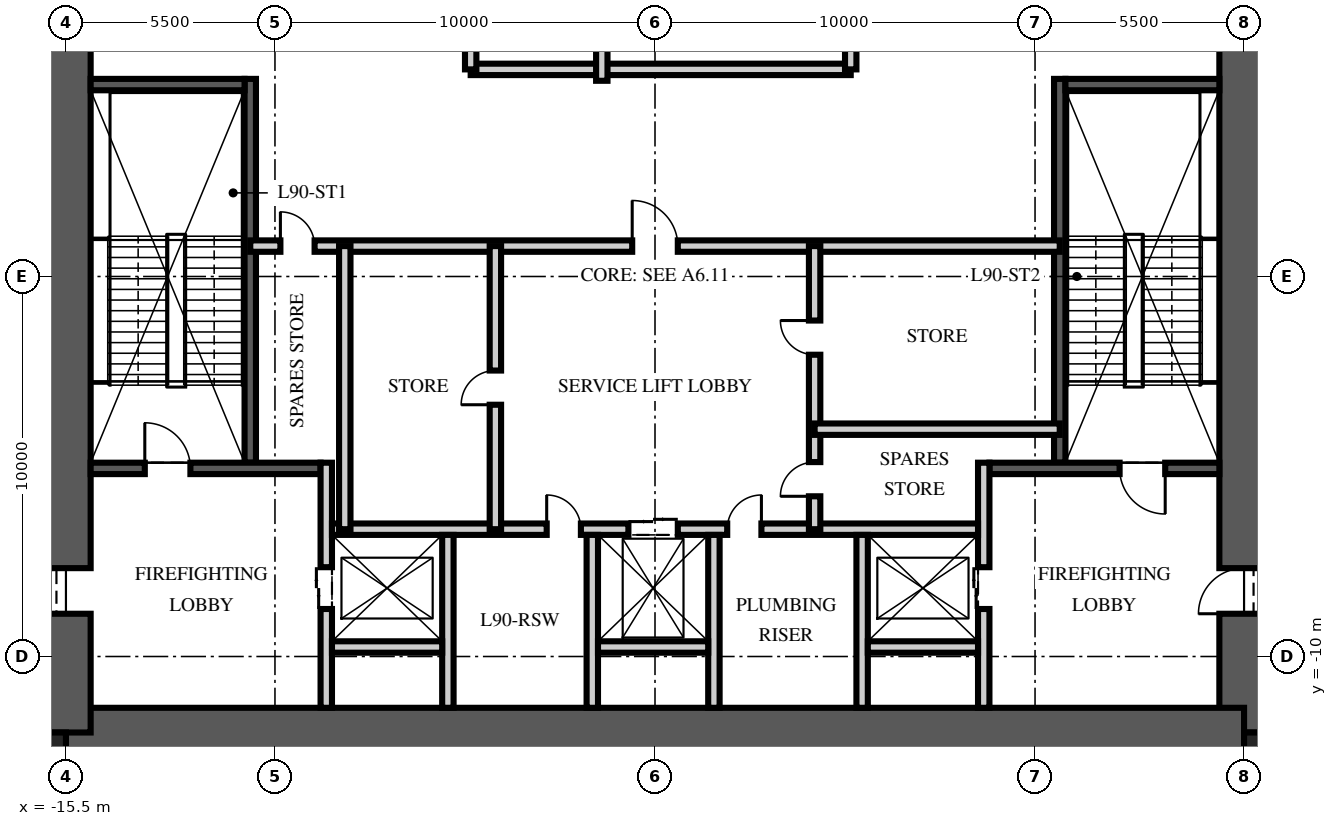
"""IFC4 building model, lengths in metres.
Left out: names, types, materials, properties, quantities, classifications, styles, units other than length and angle.
Written with IfcOpenShell. Run it as: python <this file> out.ifc"""

import sys

from ifc_helpers import new_model, si_unit, direction, frame, frame_2d, origin, origin_2d, place, context, subcontext, project, spatial, rectangle, extrude, element, fill, save


model = new_model("IFC4")
c1 = context("Model", 3, precision=1e-05, world=origin(), true_north=direction((0.0, 1.0)))
c2 = subcontext(c1, "Body", "Model", "MODEL_VIEW")
j1 = project(units=[si_unit("LENGTHUNIT", "METRE"), si_unit("PLANEANGLEUNIT", "RADIAN")], contexts=[c1])
p1 = place(None, origin())
s1 = spatial("IfcSite", under=j1, at=p1, CompositionType="ELEMENT")
p2 = place(p1, origin())
s2 = spatial("IfcBuilding", under=s1, at=p2, CompositionType="ELEMENT")
p3 = place(p2, frame((0.0, 0.0, 358.25)))
s3 = spatial("IfcBuildingStorey", under=s2, at=p3, CompositionType="ELEMENT", Elevation=358.25)
p4 = place(p3, frame((15.5, -12.0, -0.3), z_axis=(0.0, 0.0, 1.0), x_axis=(0.0, 1.0, 0.0)))
e1 = element("IfcWall", 1, at=p4, inside=s3, PredefinedType="SHEAR", context=c2, shape_type="SweptSolid", body=[
    extrude(rectangle(XDim=24.0, YDim=1.3, at=frame_2d((12.0, 0.0))), origin(), (0.0, 0.0, 1.0), 4.95),
])
p5 = place(p4, frame((3.125, 0.0, 0.3)))
e2 = element("IfcOpeningElement", 2, at=p5, cuts=e1, PredefinedType="OPENING", context=c2, shape_type="SweptSolid", body=[
    extrude(rectangle(XDim=1.2, YDim=2.1, at=frame_2d((0.6, 1.05))), frame((0.0, 0.66, 0.0), z_axis=(0.0, -1.0, 0.0), x_axis=(1.0, 0.0, 0.0)), (0.0, 0.0, 1.0), 1.32),
])
p6 = place(p4, frame((19.375, 0.0, 0.3)))
e3 = element("IfcOpeningElement", 3, at=p6, cuts=e1, PredefinedType="OPENING", context=c2, shape_type="SweptSolid", body=[
    extrude(rectangle(XDim=1.8, YDim=2.1, at=frame_2d((0.9, 1.05))), frame((0.0, 0.66, 0.0), z_axis=(0.0, -1.0, 0.0), x_axis=(1.0, 0.0, 0.0)), (0.0, 0.0, 1.0), 1.32),
])
p7 = place(p3, frame((-15.5, -12.0, -0.3), z_axis=(0.0, 0.0, 1.0), x_axis=(1.0, 0.0, 0.0)))
e4 = element("IfcWall", 4, at=p7, inside=s3, PredefinedType="SHEAR", context=c2, shape_type="SweptSolid", body=[
    extrude(rectangle(XDim=31.0, YDim=1.3, at=frame_2d((15.5, 0.0))), origin(), (0.0, 0.0, 1.0), 4.95),
])
p8 = place(p3, frame((-15.5, -12.0, -0.3), z_axis=(0.0, 0.0, 1.0), x_axis=(0.0, 1.0, 0.0)))
e5 = element("IfcWall", 5, at=p8, inside=s3, PredefinedType="SHEAR", context=c2, shape_type="SweptSolid", body=[
    extrude(rectangle(XDim=24.0, YDim=1.3, at=frame_2d((12.0, 0.0))), origin(), (0.0, 0.0, 1.0), 4.95),
])
p9 = place(p8, frame((3.125, 0.0, 0.3)))
e6 = element("IfcOpeningElement", 6, at=p9, cuts=e5, PredefinedType="OPENING", context=c2, shape_type="SweptSolid", body=[
    extrude(rectangle(XDim=1.2, YDim=2.1, at=frame_2d((0.6, 1.05))), frame((0.0, 0.66, 0.0), z_axis=(0.0, -1.0, 0.0), x_axis=(1.0, 0.0, 0.0)), (0.0, 0.0, 1.0), 1.32),
])
p10 = place(p8, frame((19.375, 0.0, 0.3)))
e7 = element("IfcOpeningElement", 7, at=p10, cuts=e5, PredefinedType="OPENING", context=c2, shape_type="SweptSolid", body=[
    extrude(rectangle(XDim=1.8, YDim=2.1, at=frame_2d((0.9, 1.05))), frame((0.0, 0.66, 0.0), z_axis=(0.0, -1.0, 0.0), x_axis=(1.0, 0.0, 0.0)), (0.0, 0.0, 1.0), 1.32),
])
for number, where, z_axis, x_axis in (
    (8, (-15.825, -12.325, -0.3), (0.0, 0.0, 1.0), (1.0, 0.0, 0.0)),
    (9, (15.825, -12.325, -0.3), (0.0, 0.0, 1.0), (1.0, 0.0, 0.0)),
):
    element("IfcColumn", number, at=place(p3, frame(where, z_axis=z_axis, x_axis=x_axis)), inside=s3, PredefinedType="COLUMN", context=c2, shape_type="SweptSolid", body=[
        extrude(rectangle(XDim=0.65, YDim=0.65, at=origin_2d()), origin(), (0.0, 0.0, 1.0), 4.95),
    ])
p11 = place(p3, frame((-10.65, -4.9, 0.0), z_axis=(0.0, 0.0, 1.0), x_axis=(0.0, 1.0, 0.0)))
e10 = element("IfcWall", 10, at=p11, inside=s3, PredefinedType="SOLIDWALL", context=c2, shape_type="SweptSolid", body=[
    extrude(rectangle(XDim=10.1, YDim=0.3, at=frame_2d((5.05, 0.0))), origin(), (0.0, 0.0, 1.0), 4.65),
])
p12 = place(p3, frame((-14.85, -5.05, 0.0), z_axis=(0.0, 0.0, 1.0), x_axis=(1.0, 0.0, 0.0)))
e11 = element("IfcWall", 11, at=p12, inside=s3, PredefinedType="SOLIDWALL", context=c2, shape_type="SweptSolid", body=[
    extrude(rectangle(XDim=6.05, YDim=0.3, at=frame_2d((3.025, 0.0))), origin(), (0.0, 0.0, 1.0), 4.65),
])
p13 = place(p12, frame((1.425, 0.0, 0.0)))
e12 = element("IfcOpeningElement", 12, at=p13, cuts=e11, PredefinedType="OPENING", context=c2, shape_type="SweptSolid", body=[
    extrude(rectangle(XDim=1.2, YDim=2.1, at=frame_2d((0.6, 1.05))), frame((0.0, 0.16, 0.0), z_axis=(0.0, -1.0, 0.0), x_axis=(1.0, 0.0, 0.0)), (0.0, 0.0, 1.0), 0.32),
])
p14 = place(p3, frame((-14.85, 5.05, 0.0), z_axis=(0.0, 0.0, 1.0), x_axis=(1.0, 0.0, 0.0)))
e13 = element("IfcWall", 13, at=p14, inside=s3, PredefinedType="SOLIDWALL", context=c2, shape_type="SweptSolid", body=[
    extrude(rectangle(XDim=4.05, YDim=0.3, at=frame_2d((2.025, 0.0))), origin(), (0.0, 0.0, 1.0), 4.65),
])
p15 = place(p3, frame((-8.65, -11.35, 0.0), z_axis=(0.0, 0.0, 1.0), x_axis=(0.0, 1.0, 0.0)))
e14 = element("IfcWall", 14, at=p15, inside=s3, PredefinedType="PARTITIONING", context=c2, shape_type="SweptSolid", body=[
    extrude(rectangle(XDim=6.45, YDim=0.3, at=frame_2d((3.225, 0.0))), origin(), (0.0, 0.0, 1.0), 4.65),
])
p16 = place(p15, frame((2.6, 0.0, 0.0)))
e15 = element("IfcOpeningElement", 15, at=p16, cuts=e14, PredefinedType="OPENING", context=c2, shape_type="SweptSolid", body=[
    extrude(rectangle(XDim=1.1, YDim=2.1, at=frame_2d((0.55, 1.05))), frame((0.0, 0.16, 0.0), z_axis=(0.0, -1.0, 0.0), x_axis=(1.0, 0.0, 0.0)), (0.0, 0.0, 1.0), 0.32),
])
p17 = place(p3, frame((10.65, -4.9, 0.0), z_axis=(0.0, 0.0, 1.0), x_axis=(0.0, 1.0, 0.0)))
e16 = element("IfcWall", 16, at=p17, inside=s3, PredefinedType="SOLIDWALL", context=c2, shape_type="SweptSolid", body=[
    extrude(rectangle(XDim=10.1, YDim=0.3, at=frame_2d((5.05, 0.0))), origin(), (0.0, 0.0, 1.0), 4.65),
])
p18 = place(p3, frame((14.85, -5.05, 0.0), z_axis=(0.0, 0.0, 1.0), x_axis=(-1.0, 0.0, 0.0)))
e17 = element("IfcWall", 17, at=p18, inside=s3, PredefinedType="SOLIDWALL", context=c2, shape_type="SweptSolid", body=[
    extrude(rectangle(XDim=6.05, YDim=0.3, at=frame_2d((3.025, 0.0))), origin(), (0.0, 0.0, 1.0), 4.65),
])
p19 = place(p18, frame((1.425, 0.0, 0.0)))
e18 = element("IfcOpeningElement", 18, at=p19, cuts=e17, PredefinedType="OPENING", context=c2, shape_type="SweptSolid", body=[
    extrude(rectangle(XDim=1.2, YDim=2.1, at=frame_2d((0.6, 1.05))), frame((0.0, 0.16, 0.0), z_axis=(0.0, -1.0, 0.0), x_axis=(1.0, 0.0, 0.0)), (0.0, 0.0, 1.0), 0.32),
])
p20 = place(p3, frame((14.85, 5.05, 0.0), z_axis=(0.0, 0.0, 1.0), x_axis=(-1.0, 0.0, 0.0)))
e19 = element("IfcWall", 19, at=p20, inside=s3, PredefinedType="SOLIDWALL", context=c2, shape_type="SweptSolid", body=[
    extrude(rectangle(XDim=4.05, YDim=0.3, at=frame_2d((2.025, 0.0))), origin(), (0.0, 0.0, 1.0), 4.65),
])
p21 = place(p3, frame((8.65, -11.35, 0.0), z_axis=(0.0, 0.0, 1.0), x_axis=(0.0, 1.0, 0.0)))
e20 = element("IfcWall", 20, at=p21, inside=s3, PredefinedType="PARTITIONING", context=c2, shape_type="SweptSolid", body=[
    extrude(rectangle(XDim=6.45, YDim=0.3, at=frame_2d((3.225, 0.0))), origin(), (0.0, 0.0, 1.0), 4.65),
])
p22 = place(p21, frame((2.6, 0.0, 0.0)))
e21 = element("IfcOpeningElement", 21, at=p22, cuts=e20, PredefinedType="OPENING", context=c2, shape_type="SweptSolid", body=[
    extrude(rectangle(XDim=1.1, YDim=2.1, at=frame_2d((0.55, 1.05))), frame((0.0, 0.16, 0.0), z_axis=(0.0, -1.0, 0.0), x_axis=(1.0, 0.0, 0.0)), (0.0, 0.0, 1.0), 0.32),
])
p23 = place(p3, frame((-8.5, -6.65, 0.0), z_axis=(0.0, 0.0, 1.0), x_axis=(1.0, 0.0, 0.0)))
e22 = element("IfcWall", 22, at=p23, inside=s3, PredefinedType="PARTITIONING", context=c2, shape_type="SweptSolid", body=[
    extrude(rectangle(XDim=17.0, YDim=0.3, at=frame_2d((8.5, 0.0))), origin(), (0.0, 0.0, 1.0), 4.65),
])
p24 = place(p23, frame((7.8, 0.0, 0.0)))
e23 = element("IfcOpeningElement", 23, at=p24, cuts=e22, PredefinedType="OPENING", context=c2, shape_type="SweptSolid", body=[
    extrude(rectangle(XDim=1.3, YDim=2.4, at=frame_2d((0.65, 1.2))), frame((0.0, 0.16, 0.0), z_axis=(0.0, -1.0, 0.0), x_axis=(1.0, 0.0, 0.0)), (0.0, 0.0, 1.0), 0.32),
])
p25 = place(p23, frame((5.65, 0.0, 0.0)))
e24 = element("IfcOpeningElement", 24, at=p25, cuts=e22, PredefinedType="OPENING", context=c2, shape_type="SweptSolid", body=[
    extrude(rectangle(XDim=0.9, YDim=2.1, at=frame_2d((0.45, 1.05))), frame((0.0, 0.16, 0.0), z_axis=(0.0, -1.0, 0.0), x_axis=(1.0, 0.0, 0.0)), (0.0, 0.0, 1.0), 0.32),
])
p26 = place(p23, frame((10.4, 0.0, 0.0)))
e25 = element("IfcOpeningElement", 25, at=p26, cuts=e22, PredefinedType="OPENING", context=c2, shape_type="SweptSolid", body=[
    extrude(rectangle(XDim=0.9, YDim=2.1, at=frame_2d((0.45, 1.05))), frame((0.0, 0.16, 0.0), z_axis=(0.0, -1.0, 0.0), x_axis=(1.0, 0.0, 0.0)), (0.0, 0.0, 1.0), 0.32),
])
for number, where, z_axis, x_axis in (
    (26, (-5.45, -11.35, 0.0), (0.0, 0.0, 1.0), (0.0, 1.0, 0.0)),
    (27, (-1.65, -11.35, 0.0), (0.0, 0.0, 1.0), (0.0, 1.0, 0.0)),
    (28, (1.55, -11.35, 0.0), (0.0, 0.0, 1.0), (0.0, 1.0, 0.0)),
    (29, (5.45, -11.35, 0.0), (0.0, 0.0, 1.0), (0.0, 1.0, 0.0)),
):
    element("IfcWall", number, at=place(p3, frame(where, z_axis=z_axis, x_axis=x_axis)), inside=s3, PredefinedType="PARTITIONING", context=c2, shape_type="SweptSolid", body=[
        extrude(rectangle(XDim=4.55, YDim=0.3, at=frame_2d((2.275, 0.0))), origin(), (0.0, 0.0, 1.0), 4.65),
    ])
for number, where, z_axis, x_axis in (
    (30, (-8.5, -9.75, 0.0), (0.0, 0.0, 1.0), (1.0, 0.0, 0.0)),
    (31, (-1.5, -9.75, 0.0), (0.0, 0.0, 1.0), (1.0, 0.0, 0.0)),
    (32, (5.6, -9.75, 0.0), (0.0, 0.0, 1.0), (1.0, 0.0, 0.0)),
):
    element("IfcWall", number, at=place(p3, frame(where, z_axis=z_axis, x_axis=x_axis)), inside=s3, PredefinedType="PARTITIONING", context=c2, shape_type="SweptSolid", body=[
        extrude(rectangle(XDim=2.9, YDim=0.3, at=frame_2d((1.45, 0.0))), origin(), (0.0, 0.0, 1.0), 4.65),
    ])
p27 = place(p3, frame((-10.65, 0.8, 0.0), z_axis=(0.0, 0.0, 1.0), x_axis=(1.0, 0.0, 0.0)))
e33 = element("IfcWall", 33, at=p27, inside=s3, PredefinedType="PARTITIONING", context=c2, shape_type="SweptSolid", body=[
    extrude(rectangle(XDim=21.3, YDim=0.3, at=frame_2d((10.65, 0.0))), origin(), (0.0, 0.0, 1.0), 4.65),
])
p28 = place(p27, frame((10.05, 0.0, 0.0)))
e34 = element("IfcOpeningElement", 34, at=p28, cuts=e33, PredefinedType="OPENING", context=c2, shape_type="SweptSolid", body=[
    extrude(rectangle(XDim=1.2, YDim=2.1, at=frame_2d((0.6, 1.05))), frame((0.0, 0.16, 0.0), z_axis=(0.0, -1.0, 0.0), x_axis=(1.0, 0.0, 0.0)), (0.0, 0.0, 1.0), 0.32),
])
p29 = place(p27, frame((0.793, 0.0, 0.0)))
e35 = element("IfcOpeningElement", 35, at=p29, cuts=e33, PredefinedType="OPENING", context=c2, shape_type="SweptSolid", body=[
    extrude(rectangle(XDim=0.9, YDim=2.1, at=frame_2d((0.45, 1.05))), frame((0.0, 0.16, 0.0), z_axis=(0.0, -1.0, 0.0), x_axis=(1.0, 0.0, 0.0)), (0.0, 0.0, 1.0), 0.32),
])
p30 = place(p3, frame((-4.2, -6.65, 0.0), z_axis=(0.0, 0.0, 1.0), x_axis=(0.0, 1.0, 0.0)))
e36 = element("IfcWall", 36, at=p30, inside=s3, PredefinedType="PARTITIONING", context=c2, shape_type="SweptSolid", body=[
    extrude(rectangle(XDim=7.45, YDim=0.3, at=frame_2d((3.725, 0.0))), origin(), (0.0, 0.0, 1.0), 4.65),
])
p31 = place(p30, frame((3.275, 0.0, 0.0)))
e37 = element("IfcOpeningElement", 37, at=p31, cuts=e36, PredefinedType="OPENING", context=c2, shape_type="SweptSolid", body=[
    extrude(rectangle(XDim=0.9, YDim=2.1, at=frame_2d((0.45, 1.05))), frame((0.0, 0.16, 0.0), z_axis=(0.0, -1.0, 0.0), x_axis=(1.0, 0.0, 0.0)), (0.0, 0.0, 1.0), 0.32),
])
p32 = place(p3, frame((4.2, -6.65, 0.0), z_axis=(0.0, 0.0, 1.0), x_axis=(0.0, 1.0, 0.0)))
e38 = element("IfcWall", 38, at=p32, inside=s3, PredefinedType="PARTITIONING", context=c2, shape_type="SweptSolid", body=[
    extrude(rectangle(XDim=7.45, YDim=0.3, at=frame_2d((3.725, 0.0))), origin(), (0.0, 0.0, 1.0), 4.65),
])
p33 = place(p32, frame((0.866, 0.0, 0.0)))
e39 = element("IfcOpeningElement", 39, at=p33, cuts=e38, PredefinedType="OPENING", context=c2, shape_type="SweptSolid", body=[
    extrude(rectangle(XDim=0.9, YDim=2.1, at=frame_2d((0.45, 1.05))), frame((0.0, 0.16, 0.0), z_axis=(0.0, -1.0, 0.0), x_axis=(1.0, 0.0, 0.0)), (0.0, 0.0, 1.0), 0.32),
])
p34 = place(p32, frame((4.591, 0.0, 0.0)))
e40 = element("IfcOpeningElement", 40, at=p34, cuts=e38, PredefinedType="OPENING", context=c2, shape_type="SweptSolid", body=[
    extrude(rectangle(XDim=0.9, YDim=2.1, at=frame_2d((0.45, 1.05))), frame((0.0, 0.16, 0.0), z_axis=(0.0, -1.0, 0.0), x_axis=(1.0, 0.0, 0.0)), (0.0, 0.0, 1.0), 0.32),
])
p35 = place(p3, frame((-8.163, -6.65, 0.0), z_axis=(0.0, 0.0, 1.0), x_axis=(0.0, 1.0, 0.0)))
e41 = element("IfcWall", 41, at=p35, inside=s3, PredefinedType="PARTITIONING", context=c2, shape_type="SweptSolid", body=[
    extrude(rectangle(XDim=7.45, YDim=0.3, at=frame_2d((3.725, 0.0))), origin(), (0.0, 0.0, 1.0), 4.65),
])
p36 = place(p3, frame((10.65, -4.018, 0.0), z_axis=(0.0, 0.0, 1.0), x_axis=(-1.0, 0.0, 0.0)))
e42 = element("IfcWall", 42, at=p36, inside=s3, PredefinedType="PARTITIONING", context=c2, shape_type="SweptSolid", body=[
    extrude(rectangle(XDim=6.45, YDim=0.3, at=frame_2d((3.225, 0.0))), origin(), (0.0, 0.0, 1.0), 4.65),
])
p37 = place(p3, frame((-4.85, 5.45, 0.0), z_axis=(0.0, 0.0, 1.0), x_axis=(1.0, 0.0, 0.0)))
e43 = element("IfcWall", 43, at=p37, inside=s3, PredefinedType="PARTITIONING", context=c2, shape_type="SweptSolid", body=[
    extrude(rectangle(XDim=10.0, YDim=0.3, at=frame_2d((5.0, 0.0))), origin(), (0.0, 0.0, 1.0), 4.65),
])
p38 = place(p3, frame((-4.85, 5.45, 0.0), z_axis=(0.0, 0.0, 1.0), x_axis=(0.0, 1.0, 0.0)))
e44 = element("IfcWall", 44, at=p38, inside=s3, PredefinedType="PARTITIONING", context=c2, shape_type="SweptSolid", body=[
    extrude(rectangle(XDim=5.9, YDim=0.3, at=frame_2d((2.95, 0.0))), origin(), (0.0, 0.0, 1.0), 4.65),
])
p39 = place(p38, frame((4.225, 0.0, 0.0)))
e45 = element("IfcOpeningElement", 45, at=p39, cuts=e44, PredefinedType="OPENING", context=c2, shape_type="SweptSolid", body=[
    extrude(rectangle(XDim=0.9, YDim=2.1, at=frame_2d((0.45, 1.05))), frame((0.0, 0.16, 0.0), z_axis=(0.0, -1.0, 0.0), x_axis=(1.0, 0.0, 0.0)), (0.0, 0.0, 1.0), 0.32),
])
p40 = place(p3, frame((5.15, 5.45, 0.0), z_axis=(0.0, 0.0, 1.0), x_axis=(0.0, 1.0, 0.0)))
e46 = element("IfcWall", 46, at=p40, inside=s3, PredefinedType="PARTITIONING", context=c2, shape_type="SweptSolid", body=[
    extrude(rectangle(XDim=5.9, YDim=0.3, at=frame_2d((2.95, 0.0))), origin(), (0.0, 0.0, 1.0), 4.65),
])
p41 = place(p40, frame((4.225, 0.0, 0.0)))
e47 = element("IfcOpeningElement", 47, at=p41, cuts=e46, PredefinedType="OPENING", context=c2, shape_type="SweptSolid", body=[
    extrude(rectangle(XDim=0.9, YDim=2.1, at=frame_2d((0.45, 1.05))), frame((0.0, 0.16, 0.0), z_axis=(0.0, -1.0, 0.0), x_axis=(1.0, 0.0, 0.0)), (0.0, 0.0, 1.0), 0.32),
])
p42 = place(p3, frame((-1.4, 5.15, 0.0), z_axis=(0.0, 0.0, 1.0), x_axis=(0.0, 1.0, 0.0)))
e48 = element("IfcWall", 48, at=p42, inside=s3, PredefinedType="PARTITIONING", context=c2, shape_type="SweptSolid", body=[
    extrude(rectangle(XDim=6.2, YDim=0.3, at=frame_2d((3.1, 0.0))), origin(), (0.0, 0.0, 1.0), 4.65),
])
p43 = place(p13, origin())
e49 = element("IfcDoor", 49, at=p43, inside=s3, OperationType="SINGLE_SWING_LEFT", PredefinedType="DOOR", context=c2, shape_type="SweptSolid", body=[
    extrude(rectangle(XDim=1.2, YDim=2.1, at=frame_2d((0.6, 1.05))), frame((0.0, 0.025, 0.0), z_axis=(0.0, -1.0, 0.0), x_axis=(1.0, 0.0, 0.0)), (0.0, 0.0, 1.0), 0.05),
])
fill(e12, e49)
p44 = place(p9, origin())
e50 = element("IfcDoor", 50, at=p44, inside=s3, OperationType="SINGLE_SWING_LEFT", PredefinedType="DOOR", context=c2, shape_type="SweptSolid", body=[
    extrude(rectangle(XDim=1.2, YDim=2.1, at=frame_2d((0.6, 1.05))), frame((0.0, 0.025, 0.0), z_axis=(0.0, -1.0, 0.0), x_axis=(1.0, 0.0, 0.0)), (0.0, 0.0, 1.0), 0.05),
])
fill(e6, e50)
p45 = place(p19, origin())
e51 = element("IfcDoor", 51, at=p45, inside=s3, OperationType="SINGLE_SWING_LEFT", PredefinedType="DOOR", context=c2, shape_type="SweptSolid", body=[
    extrude(rectangle(XDim=1.2, YDim=2.1, at=frame_2d((0.6, 1.05))), frame((0.0, 0.025, 0.0), z_axis=(0.0, -1.0, 0.0), x_axis=(1.0, 0.0, 0.0)), (0.0, 0.0, 1.0), 0.05),
])
fill(e18, e51)
p46 = place(p5, origin())
e52 = element("IfcDoor", 52, at=p46, inside=s3, OperationType="SINGLE_SWING_LEFT", PredefinedType="DOOR", context=c2, shape_type="SweptSolid", body=[
    extrude(rectangle(XDim=1.2, YDim=2.1, at=frame_2d((0.6, 1.05))), frame((0.0, 0.025, 0.0), z_axis=(0.0, -1.0, 0.0), x_axis=(1.0, 0.0, 0.0)), (0.0, 0.0, 1.0), 0.05),
])
fill(e2, e52)
p47 = place(p16, origin())
e53 = element("IfcDoor", 53, at=p47, inside=s3, OperationType="DOUBLE_DOOR_SLIDING", PredefinedType="DOOR", context=c2, shape_type="SweptSolid", body=[
    extrude(rectangle(XDim=1.1, YDim=2.1, at=frame_2d((0.55, 1.05))), frame((0.0, 0.025, 0.0), z_axis=(0.0, -1.0, 0.0), x_axis=(1.0, 0.0, 0.0)), (0.0, 0.0, 1.0), 0.05),
])
fill(e15, e53)
p48 = place(p22, origin())
e54 = element("IfcDoor", 54, at=p48, inside=s3, OperationType="DOUBLE_DOOR_SLIDING", PredefinedType="DOOR", context=c2, shape_type="SweptSolid", body=[
    extrude(rectangle(XDim=1.1, YDim=2.1, at=frame_2d((0.55, 1.05))), frame((0.0, 0.025, 0.0), z_axis=(0.0, -1.0, 0.0), x_axis=(1.0, 0.0, 0.0)), (0.0, 0.0, 1.0), 0.05),
])
fill(e21, e54)
p49 = place(p24, origin())
e55 = element("IfcDoor", 55, at=p49, inside=s3, OperationType="DOUBLE_DOOR_SLIDING", PredefinedType="DOOR", context=c2, shape_type="SweptSolid", body=[
    extrude(rectangle(XDim=1.3, YDim=2.4, at=frame_2d((0.65, 1.2))), frame((0.0, 0.025, 0.0), z_axis=(0.0, -1.0, 0.0), x_axis=(1.0, 0.0, 0.0)), (0.0, 0.0, 1.0), 0.05),
])
fill(e23, e55)
p50 = place(p28, origin())
e56 = element("IfcDoor", 56, at=p50, inside=s3, OperationType="SINGLE_SWING_LEFT", PredefinedType="DOOR", context=c2, shape_type="SweptSolid", body=[
    extrude(rectangle(XDim=1.2, YDim=2.1, at=frame_2d((0.6, 1.05))), frame((0.0, 0.025, 0.0), z_axis=(0.0, -1.0, 0.0), x_axis=(1.0, 0.0, 0.0)), (0.0, 0.0, 1.0), 0.05),
])
fill(e34, e56)
p51 = place(p25, origin())
e57 = element("IfcDoor", 57, at=p51, inside=s3, OperationType="SINGLE_SWING_LEFT", PredefinedType="DOOR", context=c2, shape_type="SweptSolid", body=[
    extrude(rectangle(XDim=0.9, YDim=2.1, at=frame_2d((0.45, 1.05))), frame((0.0, 0.025, 0.0), z_axis=(0.0, -1.0, 0.0), x_axis=(1.0, 0.0, 0.0)), (0.0, 0.0, 1.0), 0.05),
])
fill(e24, e57)
p52 = place(p26, origin())
e58 = element("IfcDoor", 58, at=p52, inside=s3, OperationType="SINGLE_SWING_RIGHT", PredefinedType="DOOR", context=c2, shape_type="SweptSolid", body=[
    extrude(rectangle(XDim=0.9, YDim=2.1, at=frame_2d((0.45, 1.05))), frame((0.0, 0.025, 0.0), z_axis=(0.0, -1.0, 0.0), x_axis=(1.0, 0.0, 0.0)), (0.0, 0.0, 1.0), 0.05),
])
fill(e25, e58)
p53 = place(p31, origin())
e59 = element("IfcDoor", 59, at=p53, inside=s3, OperationType="SINGLE_SWING_LEFT", PredefinedType="DOOR", context=c2, shape_type="SweptSolid", body=[
    extrude(rectangle(XDim=0.9, YDim=2.1, at=frame_2d((0.45, 1.05))), frame((0.0, 0.025, 0.0), z_axis=(0.0, -1.0, 0.0), x_axis=(1.0, 0.0, 0.0)), (0.0, 0.0, 1.0), 0.05),
])
fill(e37, e59)
p54 = place(p29, origin())
e60 = element("IfcDoor", 60, at=p54, inside=s3, OperationType="SINGLE_SWING_LEFT", PredefinedType="DOOR", context=c2, shape_type="SweptSolid", body=[
    extrude(rectangle(XDim=0.9, YDim=2.1, at=frame_2d((0.45, 1.05))), frame((0.0, 0.025, 0.0), z_axis=(0.0, -1.0, 0.0), x_axis=(1.0, 0.0, 0.0)), (0.0, 0.0, 1.0), 0.05),
])
fill(e35, e60)
p55 = place(p33, origin())
e61 = element("IfcDoor", 61, at=p55, inside=s3, OperationType="SINGLE_SWING_LEFT", PredefinedType="DOOR", context=c2, shape_type="SweptSolid", body=[
    extrude(rectangle(XDim=0.9, YDim=2.1, at=frame_2d((0.45, 1.05))), frame((0.0, 0.025, 0.0), z_axis=(0.0, -1.0, 0.0), x_axis=(1.0, 0.0, 0.0)), (0.0, 0.0, 1.0), 0.05),
])
fill(e39, e61)
p56 = place(p34, origin())
e62 = element("IfcDoor", 62, at=p56, inside=s3, OperationType="SINGLE_SWING_RIGHT", PredefinedType="DOOR", context=c2, shape_type="SweptSolid", body=[
    extrude(rectangle(XDim=0.9, YDim=2.1, at=frame_2d((0.45, 1.05))), frame((0.0, 0.025, 0.0), z_axis=(0.0, -1.0, 0.0), x_axis=(1.0, 0.0, 0.0)), (0.0, 0.0, 1.0), 0.05),
])
fill(e40, e62)
save(model, sys.argv[1])
